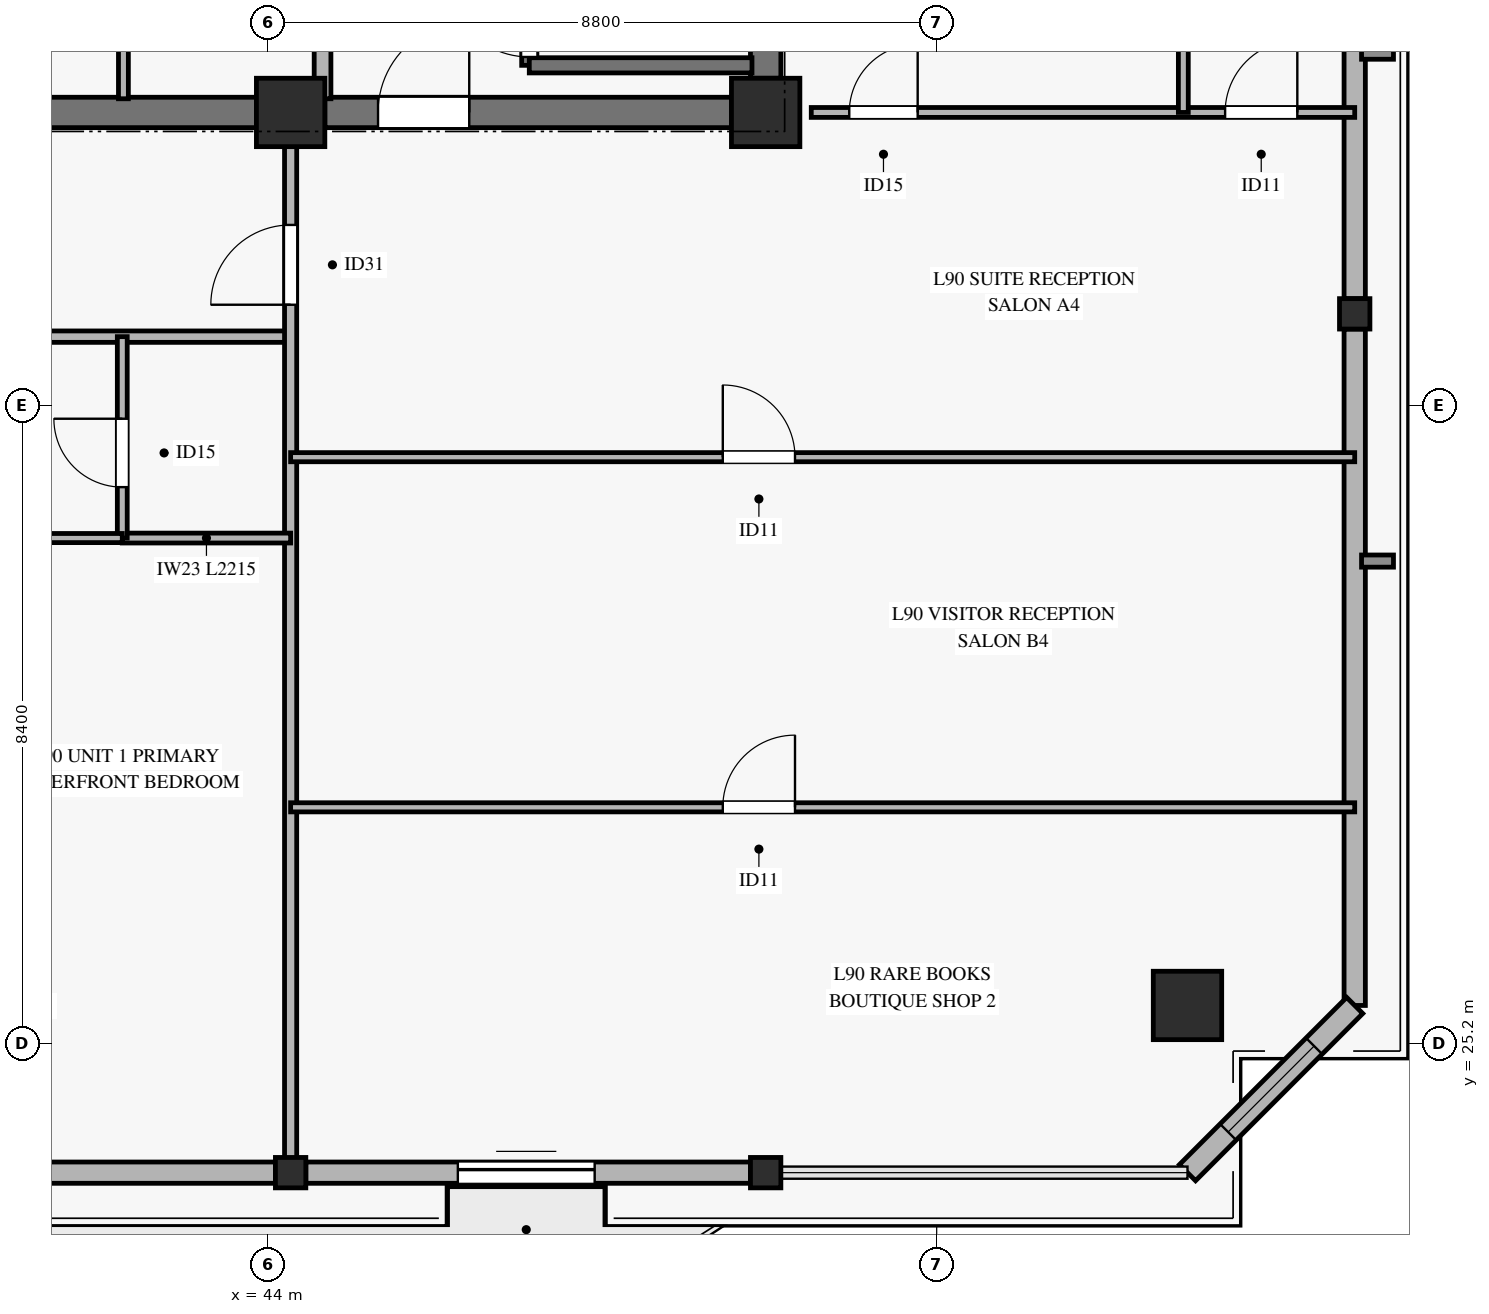
"""IFC4 building model, lengths in metres.
Left out: names, types, materials, properties, quantities, classifications, styles, units other than length and angle.
Written with IfcOpenShell. Run it as: python <this file> out.ifc"""

import sys

from ifc_helpers import new_model, si_unit, direction, frame, frame_2d, origin, origin_2d, place, context, subcontext, project, spatial, rectangle, hollow_rectangle, extrude, source, transform, mapped, element, fill, save


model = new_model("IFC4")
c1 = context("Model", 3, precision=1e-05, world=origin(), true_north=direction((0.0, 1.0)))
c2 = subcontext(c1, "Body", "Model", "MODEL_VIEW")
j1 = project(units=[si_unit("LENGTHUNIT", "METRE"), si_unit("PLANEANGLEUNIT", "RADIAN")], contexts=[c1])
p1 = place(None, origin())
s1 = spatial("IfcSite", under=j1, at=p1, CompositionType="ELEMENT")
p2 = place(p1, origin())
s2 = spatial("IfcBuilding", under=s1, at=p2, CompositionType="ELEMENT")
p3 = place(p2, frame((0.0, 0.0, 345.9)))
s3 = spatial("IfcBuildingStorey", under=s2, at=p3, CompositionType="ELEMENT", Elevation=345.9)
m1 = source(origin(), c2, "Body", "SweptSolid", [
    extrude(rectangle(XDim=0.9, YDim=0.9, at=origin_2d()), origin(), (0.0, 0.0, 1.0), 3.185),
])
for number, where, z_axis, x_axis in (
    (1, (44.3, 37.45, 0.0), (0.0, 0.0, 1.0), (1.0, 0.0, 0.0)),
    (2, (50.55, 37.45, 0.0), (0.0, 0.0, 1.0), (1.0, 0.0, 0.0)),
):
    element("IfcColumn", number, at=place(p3, frame(where, z_axis=z_axis, x_axis=x_axis)), inside=s3, PredefinedType="PILASTER", context=c2, shape_type="MappedRepresentation", body=[
        mapped(m1, transform((0.0, 0.0, 0.0), x_axis=(1.0, 0.0, 0.0), y_axis=(0.0, 1.0, 0.0), z_axis=(0.0, 0.0, 1.0), scale=1.0)),
    ])
p4 = place(p3, frame((36.05, 37.45, 0.0), z_axis=(0.0, 0.0, 1.0), x_axis=(1.0, 0.0, 0.0)))
e3 = element("IfcWall", 3, at=p4, inside=s3, PredefinedType="SHEAR", context=c2, shape_type="SweptSolid", body=[
    extrude(rectangle(XDim=7.8, YDim=0.4, at=frame_2d((3.9, 0.0))), origin(), (0.0, 0.0, 1.0), 3.185),
])
p5 = place(p3, frame((44.75, 37.45, 0.0), z_axis=(0.0, 0.0, 1.0), x_axis=(1.0, 0.0, 0.0)))
e4 = element("IfcWall", 4, at=p5, inside=s3, PredefinedType="SHEAR", context=c2, shape_type="SweptSolid", body=[
    extrude(rectangle(XDim=5.35, YDim=0.4, at=frame_2d((2.675, 0.0))), origin(), (0.0, 0.0, 1.0), 3.185),
])
p6 = place(p5, frame((0.7, 0.0, 0.0)))
e5 = element("IfcOpeningElement", 5, at=p6, cuts=e4, PredefinedType="OPENING", context=c2, shape_type="SweptSolid", body=[
    extrude(rectangle(XDim=1.2, YDim=2.15, at=frame_2d((0.6, 1.075))), frame((0.0, 0.21, 0.0), z_axis=(0.0, -1.0, 0.0), x_axis=(1.0, 0.0, 0.0)), (0.0, 0.0, 1.0), 0.42),
])
p7 = place(p3, frame((50.55, 37.9, 0.0), z_axis=(0.0, 0.0, 1.0), x_axis=(0.0, 1.0, 0.0)))
e6 = element("IfcWall", 6, at=p7, inside=s3, PredefinedType="SHEAR", context=c2, shape_type="SweptSolid", body=[
    extrude(rectangle(XDim=8.2, YDim=0.4, at=frame_2d((4.1, 0.0))), origin(), (0.0, 0.0, 1.0), 3.185),
])
m2 = source(origin(), c2, "Body", "SweptSolid", [
    extrude(hollow_rectangle(XDim=0.9, YDim=0.9, WallThickness=0.04, at=origin_2d()), origin(), (0.0, 0.0, 1.0), 3.185),
])
p8 = place(p3, frame((56.1, 25.7, 0.0), z_axis=(0.0, 0.0, 1.0), x_axis=(1.0, 0.0, 0.0)))
e7 = element("IfcColumn", 7, at=p8, inside=s3, PredefinedType="COLUMN", context=c2, shape_type="MappedRepresentation", body=[
    mapped(m2, transform((0.0, 0.0, 0.0), x_axis=(1.0, 0.0, 0.0), y_axis=(0.0, 1.0, 0.0), z_axis=(0.0, 0.0, 1.0), scale=1.0)),
])
m3 = source(origin(), c2, "Body", "SweptSolid", [
    extrude(hollow_rectangle(XDim=0.4, YDim=0.4, WallThickness=0.02, at=origin_2d()), origin(), (0.0, 0.0, 1.0), 3.185),
])
for number, where, z_axis, x_axis in (
    (8, (44.3, 23.5, 0.0), (0.0, 0.0, 1.0), (1.0, 0.0, 0.0)),
    (9, (50.55, 23.5, 0.0), (0.0, 0.0, 1.0), (1.0, 0.0, 0.0)),
    (10, (58.3, 34.8, 0.0), (0.0, 0.0, 1.0), (1.0, 0.0, 0.0)),
):
    element("IfcColumn", number, at=place(p3, frame(where, z_axis=z_axis, x_axis=x_axis)), inside=s3, PredefinedType="COLUMN", context=c2, shape_type="MappedRepresentation", body=[
        mapped(m3, transform((0.0, 0.0, 0.0), x_axis=(1.0, 0.0, 0.0), y_axis=(0.0, 1.0, 0.0), z_axis=(0.0, 0.0, 1.0), scale=1.0)),
    ])
p9 = place(p3, frame((37.75, 23.5, 0.0), z_axis=(0.0, 0.0, 1.0), x_axis=(1.0, 0.0, 0.0)))
e11 = element("IfcWall", 11, at=p9, inside=s3, PredefinedType="SOLIDWALL", context=c2, shape_type="SweptSolid", body=[
    extrude(rectangle(XDim=6.35, YDim=0.28, at=frame_2d((3.175, 0.0))), origin(), (0.0, 0.0, 1.0), 2.815),
])
p10 = place(p3, frame((44.5, 23.5, 0.0), z_axis=(0.0, 0.0, 1.0), x_axis=(1.0, 0.0, 0.0)))
e12 = element("IfcWall", 12, at=p10, inside=s3, PredefinedType="SOLIDWALL", context=c2, shape_type="SweptSolid", body=[
    extrude(rectangle(XDim=5.85, YDim=0.28, at=frame_2d((2.925, 0.0))), origin(), (0.0, 0.0, 1.0), 2.815),
])
p11 = place(p10, frame((2.0, 0.0, 0.0)))
e13 = element("IfcOpeningElement", 13, at=p11, cuts=e12, PredefinedType="OPENING", context=c2, shape_type="SweptSolid", body=[
    extrude(rectangle(XDim=1.8, YDim=2.25, at=frame_2d((0.9, 1.125))), frame((0.0, 0.15, 0.0), z_axis=(0.0, -1.0, 0.0), x_axis=(1.0, 0.0, 0.0)), (0.0, 0.0, 1.0), 0.3),
])
p12 = place(p3, frame((58.3, 25.7, 0.0), z_axis=(0.0, 0.0, 1.0), x_axis=(0.0, 1.0, 0.0)))
e14 = element("IfcWall", 14, at=p12, inside=s3, PredefinedType="SOLIDWALL", context=c2, shape_type="SweptSolid", body=[
    extrude(rectangle(XDim=8.9, YDim=0.28, at=frame_2d((4.45, 0.0))), origin(), (0.0, 0.0, 1.0), 2.815),
])
p13 = place(p3, frame((58.3, 35.0, 0.0), z_axis=(0.0, 0.0, 1.0), x_axis=(0.0, 1.0, 0.0)))
e15 = element("IfcWall", 15, at=p13, inside=s3, PredefinedType="SOLIDWALL", context=c2, shape_type="SweptSolid", body=[
    extrude(rectangle(XDim=8.9, YDim=0.28, at=frame_2d((4.45, 0.0))), origin(), (0.0, 0.0, 1.0), 2.815),
])
p14 = place(p13, frame((3.35, 0.0, 0.45)))
e16 = element("IfcOpeningElement", 16, at=p14, cuts=e15, PredefinedType="OPENING", context=c2, shape_type="SweptSolid", body=[
    extrude(rectangle(XDim=2.2, YDim=2.1, at=frame_2d((1.1, 1.05))), frame((0.0, 0.15, 0.0), z_axis=(0.0, -1.0, 0.0), x_axis=(1.0, 0.0, 0.0)), (0.0, 0.0, 1.0), 0.3),
])
p15 = place(p3, frame((56.1, 23.5, 0.0), z_axis=(0.0, 0.0, 1.0), x_axis=(0.707106781187, 0.707106781187, 0.0)))
e17 = element("IfcWall", 17, at=p15, inside=s3, PredefinedType="SOLIDWALL", context=c2, shape_type="SweptSolid", body=[
    extrude(rectangle(XDim=3.111, YDim=0.3, at=frame_2d((1.556, 0.0))), origin(), (0.0, 0.0, 1.0), 2.815),
])
p16 = place(p15, frame((0.756, 0.0, 0.45)))
e18 = element("IfcOpeningElement", 18, at=p16, cuts=e17, PredefinedType="OPENING", context=c2, shape_type="SweptSolid", body=[
    extrude(rectangle(XDim=1.6, YDim=2.0, at=frame_2d((0.8, 1.0))), frame((0.0, 0.16, 0.0), z_axis=(0.0, -1.0, 0.0), x_axis=(1.0, 0.0, 0.0)), (0.0, 0.0, 1.0), 0.32),
])
p17 = place(p3, frame((47.44, 38.07, 0.0), z_axis=(0.0, 0.0, 1.0), x_axis=(0.0, 1.0, 0.0)))
e19 = element("IfcWall", 19, at=p17, inside=s3, PredefinedType="SOLIDWALL", context=c2, shape_type="SweptSolid", body=[
    extrude(rectangle(XDim=7.25, YDim=0.2, at=frame_2d((3.625, 0.0))), origin(), (0.0, 0.0, 1.0), 3.4),
])
p18 = place(p17, frame((0.11, 0.0, 0.0)))
e20 = element("IfcOpeningElement", 20, at=p18, cuts=e19, PredefinedType="OPENING", context=c2, shape_type="SweptSolid", body=[
    extrude(rectangle(XDim=1.1, YDim=2.15, at=frame_2d((0.55, 1.075))), frame((0.0, 0.11, 0.0), z_axis=(0.0, -1.0, 0.0), x_axis=(1.0, 0.0, 0.0)), (0.0, 0.0, 1.0), 0.22),
])
p19 = place(p3, frame((47.44, 38.07, 0.0), z_axis=(0.0, 0.0, 1.0), x_axis=(1.0, 0.0, 0.0)))
e21 = element("IfcWall", 21, at=p19, inside=s3, PredefinedType="SOLIDWALL", context=c2, shape_type="SweptSolid", body=[
    extrude(rectangle(XDim=2.93, YDim=0.2, at=frame_2d((1.465, 0.0))), origin(), (0.0, 0.0, 1.0), 3.4),
])
p20 = place(p3, frame((44.72, 37.63, 0.0), z_axis=(0.0, 0.0, 1.0), x_axis=(0.0, 1.0, 0.0)))
e22 = element("IfcWall", 22, at=p20, inside=s3, PredefinedType="SOLIDWALL", context=c2, shape_type="SweptSolid", body=[
    extrude(rectangle(XDim=7.59, YDim=0.22, at=frame_2d((3.795, 0.0))), origin(), (0.0, 0.0, 1.0), 3.185),
])
p21 = place(p3, frame((42.1, 37.63, 0.0), z_axis=(0.0, 0.0, 1.0), x_axis=(0.0, 1.0, 0.0)))
e23 = element("IfcWall", 23, at=p21, inside=s3, PredefinedType="PARTITIONING", context=c2, shape_type="SweptSolid", body=[
    extrude(rectangle(XDim=8.74, YDim=0.13, at=frame_2d((4.37, 0.0))), origin(), (0.0, 0.0, 1.0), 3.185),
])
p22 = place(p21, frame((2.17, 0.0, 0.0)))
e24 = element("IfcOpeningElement", 24, at=p22, cuts=e23, PredefinedType="OPENING", context=c2, shape_type="SweptSolid", body=[
    extrude(rectangle(XDim=0.9, YDim=2.1, at=frame_2d((0.45, 1.05))), frame((0.0, 0.075, 0.0), z_axis=(0.0, -1.0, 0.0), x_axis=(1.0, 0.0, 0.0)), (0.0, 0.0, 1.0), 0.15),
])
p23 = place(p3, frame((23.5, 34.5, 0.0), z_axis=(0.0, 0.0, 1.0), x_axis=(1.0, 0.0, 0.0)))
e25 = element("IfcWall", 25, at=p23, inside=s3, PredefinedType="PARTITIONING", context=c2, shape_type="SweptSolid", body=[
    extrude(rectangle(XDim=20.8, YDim=0.15, at=frame_2d((10.4, 0.0))), origin(), (0.0, 0.0, 1.0), 2.47),
])
p24 = place(p23, frame((4.767, 0.0, 0.0)))
e26 = element("IfcOpeningElement", 26, at=p24, cuts=e25, PredefinedType="OPENING", context=c2, shape_type="SweptSolid", body=[
    extrude(rectangle(XDim=1.05, YDim=2.15, at=frame_2d((0.525, 1.075))), frame((0.0, 0.085, 0.0), z_axis=(0.0, -1.0, 0.0), x_axis=(1.0, 0.0, 0.0)), (0.0, 0.0, 1.0), 0.17),
])
p25 = place(p23, frame((16.025, 0.0, 0.0)))
e27 = element("IfcOpeningElement", 27, at=p25, cuts=e25, PredefinedType="OPENING", context=c2, shape_type="SweptSolid", body=[
    extrude(rectangle(XDim=1.05, YDim=2.15, at=frame_2d((0.525, 1.075))), frame((0.0, 0.085, 0.0), z_axis=(0.0, -1.0, 0.0), x_axis=(1.0, 0.0, 0.0)), (0.0, 0.0, 1.0), 0.17),
])
p26 = place(p3, frame((44.3, 23.5, 0.0), z_axis=(0.0, 0.0, 1.0), x_axis=(0.0, 1.0, 0.0)))
e28 = element("IfcWall", 28, at=p26, inside=s3, PredefinedType="PARTITIONING", context=c2, shape_type="SweptSolid", body=[
    extrude(rectangle(XDim=13.95, YDim=0.16, at=frame_2d((6.975, 0.0))), origin(), (0.0, 0.0, 1.0), 2.47),
])
p27 = place(p26, frame((11.42, 0.0, 0.0)))
e29 = element("IfcOpeningElement", 29, at=p27, cuts=e28, PredefinedType="OPENING", context=c2, shape_type="SweptSolid", body=[
    extrude(rectangle(XDim=1.05, YDim=2.15, at=frame_2d((0.525, 1.075))), frame((0.0, 0.09, 0.0), z_axis=(0.0, -1.0, 0.0), x_axis=(1.0, 0.0, 0.0)), (0.0, 0.0, 1.0), 0.18),
])
p28 = place(p3, frame((42.085, 31.85, 0.0), z_axis=(0.0, 0.0, 1.0), x_axis=(1.0, 0.0, 0.0)))
e30 = element("IfcWall", 30, at=p28, inside=s3, PredefinedType="PARTITIONING", context=c2, shape_type="SweptSolid", body=[
    extrude(rectangle(XDim=2.215, YDim=0.13, at=frame_2d((1.107, 0.0))), origin(), (0.0, 0.0, 1.0), 2.47),
])
p29 = place(p3, frame((42.085, 31.85, 0.0), z_axis=(0.0, 0.0, 1.0), x_axis=(0.0, 1.0, 0.0)))
e31 = element("IfcWall", 31, at=p29, inside=s3, PredefinedType="PARTITIONING", context=c2, shape_type="SweptSolid", body=[
    extrude(rectangle(XDim=2.65, YDim=0.13, at=frame_2d((1.325, 0.0))), origin(), (0.0, 0.0, 1.0), 2.77),
])
p30 = place(p29, frame((0.67, 0.0, 0.0)))
e32 = element("IfcOpeningElement", 32, at=p30, cuts=e31, PredefinedType="OPENING", context=c2, shape_type="SweptSolid", body=[
    extrude(rectangle(XDim=0.9, YDim=2.1, at=frame_2d((0.45, 1.05))), frame((0.0, 0.075, 0.0), z_axis=(0.0, -1.0, 0.0), x_axis=(1.0, 0.0, 0.0)), (0.0, 0.0, 1.0), 0.15),
])
p31 = place(p3, frame((39.95, 31.85, 0.0), z_axis=(0.0, 0.0, 1.0), x_axis=(1.0, 0.0, 0.0)))
e33 = element("IfcWall", 33, at=p31, inside=s3, PredefinedType="PARTITIONING", context=c2, shape_type="SweptSolid", body=[
    extrude(rectangle(XDim=2.135, YDim=0.12, at=frame_2d((1.067, 0.0))), origin(), (0.0, 0.0, 1.0), 3.185),
])
p32 = place(p3, frame((44.3, 28.307, 0.0), z_axis=(0.0, 0.0, 1.0), x_axis=(1.0, 0.0, 0.0)))
e34 = element("IfcWall", 34, at=p32, inside=s3, PredefinedType="PARTITIONING", context=c2, shape_type="SweptSolid", body=[
    extrude(rectangle(XDim=14.0, YDim=0.12, at=frame_2d((7.0, 0.0))), origin(), (0.0, 0.0, 1.0), 2.47),
])
p33 = place(p32, frame((5.686, 0.0, 0.0)))
e35 = element("IfcOpeningElement", 35, at=p33, cuts=e34, PredefinedType="OPENING", context=c2, shape_type="SweptSolid", body=[
    extrude(rectangle(XDim=0.95, YDim=2.1, at=frame_2d((0.475, 1.05))), frame((0.0, 0.07, 0.0), z_axis=(0.0, -1.0, 0.0), x_axis=(1.0, 0.0, 0.0)), (0.0, 0.0, 1.0), 0.14),
])
p34 = place(p3, frame((44.3, 32.914, 0.0), z_axis=(0.0, 0.0, 1.0), x_axis=(1.0, 0.0, 0.0)))
e36 = element("IfcWall", 36, at=p34, inside=s3, PredefinedType="PARTITIONING", context=c2, shape_type="SweptSolid", body=[
    extrude(rectangle(XDim=14.0, YDim=0.12, at=frame_2d((7.0, 0.0))), origin(), (0.0, 0.0, 1.0), 2.47),
])
p35 = place(p34, frame((5.686, 0.0, 0.0)))
e37 = element("IfcOpeningElement", 37, at=p35, cuts=e36, PredefinedType="OPENING", context=c2, shape_type="SweptSolid", body=[
    extrude(rectangle(XDim=0.95, YDim=2.1, at=frame_2d((0.475, 1.05))), frame((0.0, 0.07, 0.0), z_axis=(0.0, -1.0, 0.0), x_axis=(1.0, 0.0, 0.0)), (0.0, 0.0, 1.0), 0.14),
])
p36 = place(p3, frame((51.15, 37.45, 0.0), z_axis=(0.0, 0.0, 1.0), x_axis=(1.0, 0.0, 0.0)))
e38 = element("IfcWall", 38, at=p36, inside=s3, PredefinedType="PARTITIONING", context=c2, shape_type="SweptSolid", body=[
    extrude(rectangle(XDim=7.15, YDim=0.13, at=frame_2d((3.575, 0.0))), origin(), (0.0, 0.0, 1.0), 2.82),
])
p37 = place(p36, frame((0.5, 0.0, 0.0)))
e39 = element("IfcOpeningElement", 39, at=p37, cuts=e38, PredefinedType="OPENING", context=c2, shape_type="SweptSolid", body=[
    extrude(rectangle(XDim=0.9, YDim=2.1, at=frame_2d((0.45, 1.05))), frame((0.0, 0.075, 0.0), z_axis=(0.0, -1.0, 0.0), x_axis=(1.0, 0.0, 0.0)), (0.0, 0.0, 1.0), 0.15),
])
p38 = place(p36, frame((5.445, 0.0, 0.0)))
e40 = element("IfcOpeningElement", 40, at=p38, cuts=e38, PredefinedType="OPENING", context=c2, shape_type="SweptSolid", body=[
    extrude(rectangle(XDim=0.95, YDim=2.1, at=frame_2d((0.475, 1.05))), frame((0.0, 0.075, 0.0), z_axis=(0.0, -1.0, 0.0), x_axis=(1.0, 0.0, 0.0)), (0.0, 0.0, 1.0), 0.15),
])
p39 = place(p3, frame((56.045, 37.45, 0.0), z_axis=(0.0, 0.0, 1.0), x_axis=(0.0, 1.0, 0.0)))
e41 = element("IfcWall", 41, at=p39, inside=s3, PredefinedType="PARTITIONING", context=c2, shape_type="SweptSolid", body=[
    extrude(rectangle(XDim=8.8, YDim=0.13, at=frame_2d((4.4, 0.0))), origin(), (0.0, 0.0, 1.0), 2.82),
])
m4 = source(origin(), c2, "Body", "SweptSolid", [
    extrude(rectangle(XDim=1.8, YDim=2.25, at=frame_2d((0.9, 1.125))), frame((0.0, 0.025, 0.0), z_axis=(0.0, -1.0, 0.0), x_axis=(1.0, 0.0, 0.0)), (0.0, 0.0, 1.0), 0.05),
])
p40 = place(p11, origin())
e42 = element("IfcDoor", 42, at=p40, inside=s3, OperationType="SLIDING_TO_LEFT", PredefinedType="DOOR", context=c2, shape_type="MappedRepresentation", body=[
    mapped(m4, transform((0.0, 0.0, 0.0), x_axis=(1.0, 0.0, 0.0), y_axis=(0.0, 1.0, 0.0), z_axis=(0.0, 0.0, 1.0), scale=1.0)),
])
fill(e13, e42)
m5 = source(origin(), c2, "Body", "SweptSolid", [
    extrude(rectangle(XDim=1.6, YDim=2.0, at=frame_2d((0.8, 1.0))), frame((0.0, 0.03, 0.0), z_axis=(0.0, -1.0, 0.0), x_axis=(1.0, 0.0, 0.0)), (0.0, 0.0, 1.0), 0.06),
])
p41 = place(p16, origin())
e43 = element("IfcWindow", 43, at=p41, inside=s3, PartitioningType="SINGLE_PANEL", PredefinedType="WINDOW", context=c2, shape_type="MappedRepresentation", body=[
    mapped(m5, transform((0.0, 0.0, 0.0), x_axis=(1.0, 0.0, 0.0), y_axis=(0.0, 1.0, 0.0), z_axis=(0.0, 0.0, 1.0), scale=1.0)),
])
fill(e18, e43)
m6 = source(origin(), c2, "Body", "SweptSolid", [
    extrude(rectangle(XDim=1.1, YDim=2.15, at=frame_2d((0.55, 1.075))), frame((0.0, 0.025, 0.0), z_axis=(0.0, -1.0, 0.0), x_axis=(1.0, 0.0, 0.0)), (0.0, 0.0, 1.0), 0.05),
])
p42 = place(p18, origin())
e44 = element("IfcDoor", 44, at=p42, inside=s3, OperationType="SINGLE_SWING_RIGHT", PredefinedType="DOOR", context=c2, shape_type="MappedRepresentation", body=[
    mapped(m6, transform((0.0, 0.0, 0.0), x_axis=(1.0, 0.0, 0.0), y_axis=(0.0, 1.0, 0.0), z_axis=(0.0, 0.0, 1.0), scale=1.0)),
])
fill(e20, e44)
m7 = source(origin(), c2, "Body", "SweptSolid", [
    extrude(rectangle(XDim=1.2, YDim=2.15, at=frame_2d((0.6, 1.075))), frame((0.0, 0.025, 0.0), z_axis=(0.0, -1.0, 0.0), x_axis=(1.0, 0.0, 0.0)), (0.0, 0.0, 1.0), 0.05),
])
p43 = place(p6, origin())
e45 = element("IfcDoor", 45, at=p43, inside=s3, OperationType="SINGLE_SWING_RIGHT", PredefinedType="DOOR", context=c2, shape_type="MappedRepresentation", body=[
    mapped(m7, transform((0.0, 0.0, 0.0), x_axis=(1.0, 0.0, 0.0), y_axis=(0.0, 1.0, 0.0), z_axis=(0.0, 0.0, 1.0), scale=1.0)),
])
fill(e5, e45)
m8 = source(origin(), c2, "Body", "SweptSolid", [
    extrude(rectangle(XDim=0.9, YDim=2.1, at=frame_2d((0.45, 1.05))), frame((0.0, 0.025, 0.0), z_axis=(0.0, -1.0, 0.0), x_axis=(1.0, 0.0, 0.0)), (0.0, 0.0, 1.0), 0.05),
])
p44 = place(p30, origin())
e46 = element("IfcDoor", 46, at=p44, inside=s3, OperationType="SINGLE_SWING_RIGHT", PredefinedType="DOOR", context=c2, shape_type="MappedRepresentation", body=[
    mapped(m8, transform((0.0, 0.0, 0.0), x_axis=(1.0, 0.0, 0.0), y_axis=(0.0, 1.0, 0.0), z_axis=(0.0, 0.0, 1.0), scale=1.0)),
])
fill(e32, e46)
m9 = source(origin(), c2, "Body", "SweptSolid", [
    extrude(rectangle(XDim=1.05, YDim=2.15, at=frame_2d((0.525, 1.075))), frame((0.0, 0.025, 0.0), z_axis=(0.0, -1.0, 0.0), x_axis=(1.0, 0.0, 0.0)), (0.0, 0.0, 1.0), 0.05),
])
p45 = place(p27, origin())
e47 = element("IfcDoor", 47, at=p45, inside=s3, OperationType="SINGLE_SWING_LEFT", PredefinedType="DOOR", context=c2, shape_type="MappedRepresentation", body=[
    mapped(m9, transform((0.0, 0.0, 0.0), x_axis=(1.0, 0.0, 0.0), y_axis=(0.0, 1.0, 0.0), z_axis=(0.0, 0.0, 1.0), scale=1.0)),
])
fill(e29, e47)
m10 = source(origin(), c2, "Body", "SweptSolid", [
    extrude(rectangle(XDim=0.95, YDim=2.1, at=frame_2d((0.475, 1.05))), frame((0.0, 0.025, 0.0), z_axis=(0.0, -1.0, 0.0), x_axis=(1.0, 0.0, 0.0)), (0.0, 0.0, 1.0), 0.05),
])
p46 = place(p35, origin())
e48 = element("IfcDoor", 48, at=p46, inside=s3, OperationType="SINGLE_SWING_LEFT", PredefinedType="DOOR", context=c2, shape_type="MappedRepresentation", body=[
    mapped(m10, transform((0.0, 0.0, 0.0), x_axis=(1.0, 0.0, 0.0), y_axis=(0.0, 1.0, 0.0), z_axis=(0.0, 0.0, 1.0), scale=1.0)),
])
fill(e37, e48)
p47 = place(p33, origin())
e49 = element("IfcDoor", 49, at=p47, inside=s3, OperationType="SINGLE_SWING_RIGHT", PredefinedType="DOOR", context=c2, shape_type="MappedRepresentation", body=[
    mapped(m10, transform((0.0, 0.0, 0.0), x_axis=(1.0, 0.0, 0.0), y_axis=(0.0, 1.0, 0.0), z_axis=(0.0, 0.0, 1.0), scale=1.0)),
])
fill(e35, e49)
p48 = place(p37, origin())
e50 = element("IfcDoor", 50, at=p48, inside=s3, OperationType="SINGLE_SWING_RIGHT", PredefinedType="DOOR", context=c2, shape_type="MappedRepresentation", body=[
    mapped(m8, transform((0.0, 0.0, 0.0), x_axis=(1.0, 0.0, 0.0), y_axis=(0.0, 1.0, 0.0), z_axis=(0.0, 0.0, 1.0), scale=1.0)),
])
fill(e39, e50)
p49 = place(p38, origin())
e51 = element("IfcDoor", 51, at=p49, inside=s3, OperationType="SINGLE_SWING_RIGHT", PredefinedType="DOOR", context=c2, shape_type="MappedRepresentation", body=[
    mapped(m10, transform((0.0, 0.0, 0.0), x_axis=(1.0, 0.0, 0.0), y_axis=(0.0, 1.0, 0.0), z_axis=(0.0, 0.0, 1.0), scale=1.0)),
])
fill(e40, e51)
save(model, sys.argv[1])
